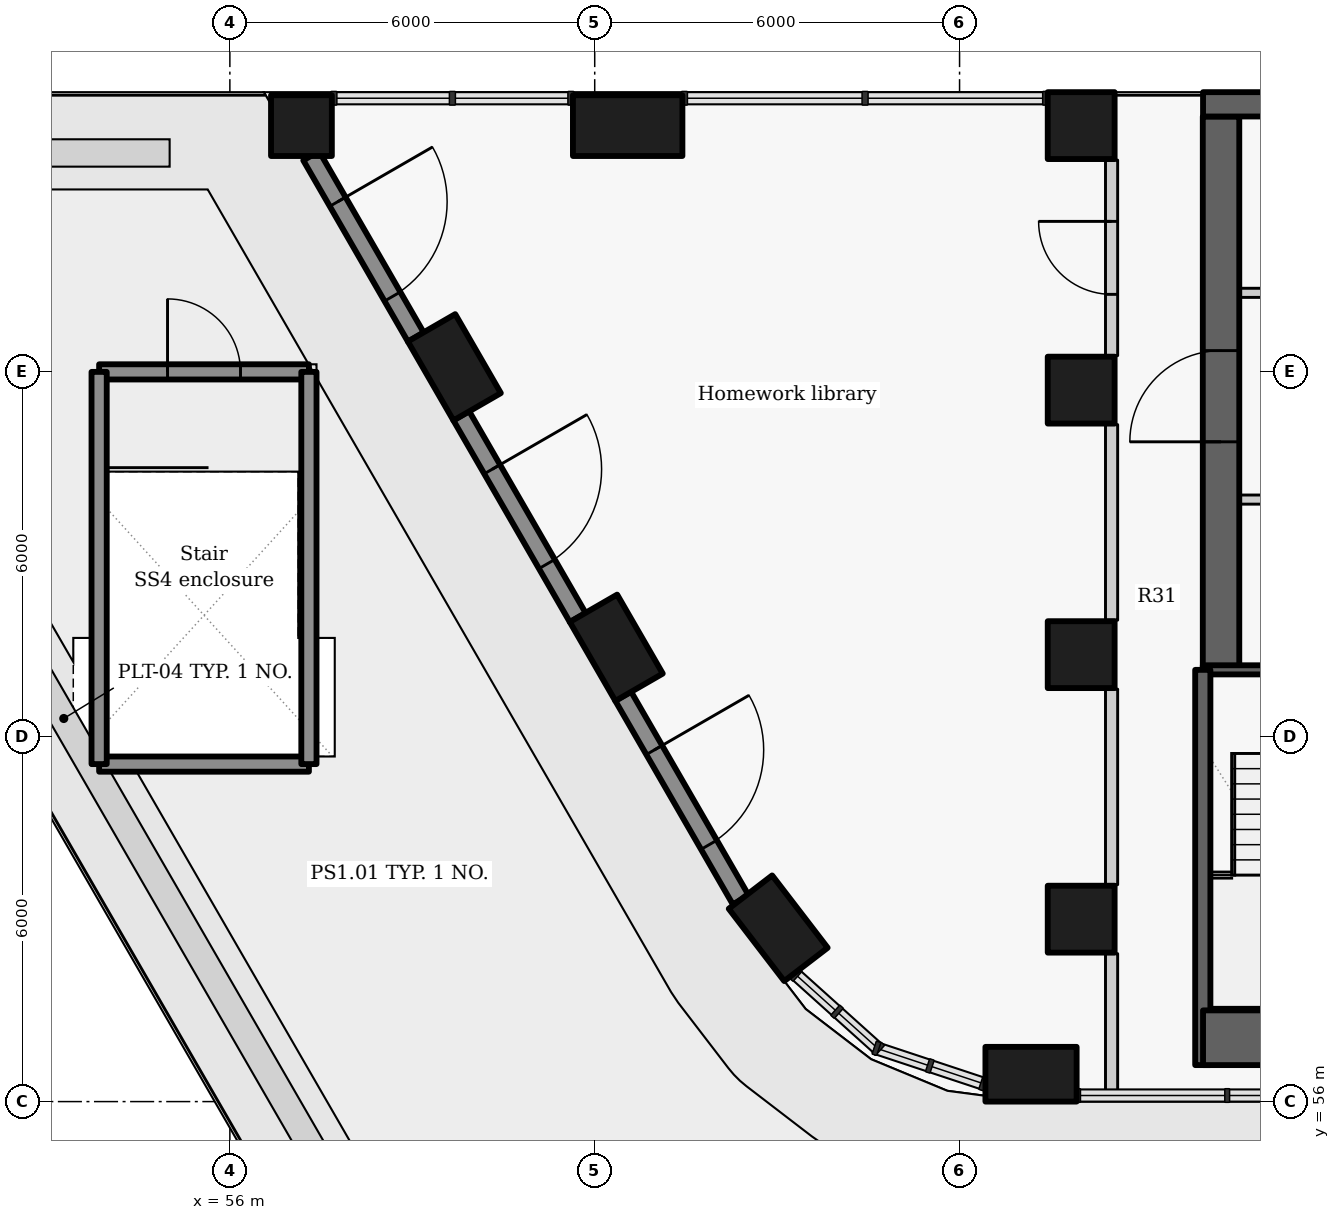
"""IFC4 building model, lengths in metres.
Left out: names, types, materials, properties, quantities, classifications, styles, units other than length and angle.
Written with IfcOpenShell. Run it as: python <this file> out.ifc"""

import sys

from ifc_helpers import new_model, si_unit, direction, frame, frame_2d, origin, origin_2d, place, context, subcontext, project, spatial, rectangle, extrude, element, fill, save


model = new_model("IFC4")
c1 = context("Model", 3, precision=1e-05, world=origin(), true_north=direction((0.0, 1.0)))
c2 = subcontext(c1, "Body", "Model", "MODEL_VIEW")
j1 = project(units=[si_unit("LENGTHUNIT", "METRE"), si_unit("PLANEANGLEUNIT", "RADIAN")], contexts=[c1])
p1 = place(None, origin())
s1 = spatial("IfcSite", under=j1, at=p1, CompositionType="ELEMENT")
p2 = place(p1, origin())
s2 = spatial("IfcBuilding", under=s1, at=p2, CompositionType="ELEMENT")
p3 = place(p2, frame((0.0, 0.0, 28.2)))
s3 = spatial("IfcBuildingStorey", under=s2, at=p3, CompositionType="ELEMENT", Elevation=28.2)
for number, where, z_axis, x_axis in (
    (1, (59.692, 68.075, 0.0), (0.0, 0.0, 1.0), (0.5, -0.866, 0.0)),
    (2, (62.354, 63.463, 0.0), (0.0, 0.0, 1.0), (0.5, -0.866, 0.0)),
    (3, (65.018, 58.851, 0.0), (0.0, 0.0, 1.0), (0.609, -0.793, 0.0)),
    (4, (69.175, 56.45, 0.0), (0.0, 0.0, 1.0), (1.0, 0.0, 0.0)),
):
    element("IfcColumn", number, at=place(p3, frame(where, z_axis=z_axis, x_axis=x_axis)), inside=s3, PredefinedType="COLUMN", context=c2, shape_type="SweptSolid", body=[
        extrude(rectangle(XDim=1.5, YDim=0.9, at=origin_2d()), origin(), (0.0, 0.0, 1.0), 3.3),
    ])
for number, where, z_axis, x_axis in (
    (5, (70.0, 72.05, 0.0), (0.0, 0.0, 1.0), (0.0, -1.0, 0.0)),
    (6, (70.0, 67.7, 0.0), (0.0, 0.0, 1.0), (0.0, -1.0, 0.0)),
    (7, (70.0, 63.35, 0.0), (0.0, 0.0, 1.0), (0.0, -1.0, 0.0)),
    (8, (70.0, 59.0, 0.0), (0.0, 0.0, 1.0), (0.0, -1.0, 0.0)),
):
    element("IfcColumn", number, at=place(p3, frame(where, z_axis=z_axis, x_axis=x_axis)), inside=s3, PredefinedType="COLUMN", context=c2, shape_type="SweptSolid", body=[
        extrude(rectangle(XDim=1.1, YDim=1.1, at=origin_2d()), origin(), (0.0, 0.0, 1.0), 3.3),
    ])
p4 = place(p3, frame((62.542, 72.05, 0.0), z_axis=(0.0, 0.0, 1.0), x_axis=(1.0, 0.0, 0.0)))
e9 = element("IfcColumn", 9, at=p4, inside=s3, PredefinedType="COLUMN", context=c2, shape_type="SweptSolid", body=[
    extrude(rectangle(XDim=1.8, YDim=1.0, at=origin_2d()), origin(), (0.0, 0.0, 1.0), 3.3),
])
p5 = place(p3, frame((57.177, 72.05, 0.0), z_axis=(0.0, 0.0, 1.0), x_axis=(1.0, 0.0, 0.0)))
e10 = element("IfcColumn", 10, at=p5, inside=s3, PredefinedType="COLUMN", context=c2, shape_type="SweptSolid", body=[
    extrude(rectangle(XDim=1.0, YDim=1.0, at=origin_2d()), origin(), (0.0, 0.0, 1.0), 3.3),
])
p6 = place(p3, frame((57.337, 71.553, 0.0), z_axis=(0.0, 0.0, 1.0), x_axis=(0.500035437112, -0.866004943191, 0.0)))
e11 = element("IfcWall", 11, at=p6, inside=s3, PredefinedType="SOLIDWALL", context=c2, shape_type="SweptSolid", body=[
    extrude(rectangle(XDim=3.444, YDim=0.3, at=frame_2d((1.722, 0.0))), origin(), (0.0, 0.0, 1.0), 2.425),
])
p7 = place(p6, frame((0.872, 0.0, 0.0)))
e12 = element("IfcOpeningElement", 12, at=p7, cuts=e11, PredefinedType="OPENING", context=c2, shape_type="SweptSolid", body=[
    extrude(rectangle(XDim=1.8, YDim=2.0, at=frame_2d((0.9, 1.0))), frame((0.0, 0.16, 0.0), z_axis=(0.0, -1.0, 0.0), x_axis=(1.0, 0.0, 0.0)), (0.0, 0.0, 1.0), 0.32),
])
p8 = place(p3, frame((59.805, 67.279, 0.0), z_axis=(0.0, 0.0, 1.0), x_axis=(0.500001735503, -0.866024401789, 0.0)))
e13 = element("IfcWall", 13, at=p8, inside=s3, PredefinedType="SOLIDWALL", context=c2, shape_type="SweptSolid", body=[
    extrude(rectangle(XDim=3.834, YDim=0.3, at=frame_2d((1.917, 0.0))), origin(), (0.0, 0.0, 1.0), 2.425),
])
p9 = place(p8, frame((1.017, 0.0, 0.0)))
e14 = element("IfcOpeningElement", 14, at=p9, cuts=e13, PredefinedType="OPENING", context=c2, shape_type="SweptSolid", body=[
    extrude(rectangle(XDim=1.8, YDim=2.0, at=frame_2d((0.9, 1.0))), frame((0.0, 0.16, 0.0), z_axis=(0.0, -1.0, 0.0), x_axis=(1.0, 0.0, 0.0)), (0.0, 0.0, 1.0), 0.32),
])
p10 = place(p3, frame((62.468, 62.667, 0.0), z_axis=(0.0, 0.0, 1.0), x_axis=(0.499948341072, -0.866055227026, 0.0)))
e15 = element("IfcWall", 15, at=p10, inside=s3, PredefinedType="SOLIDWALL", context=c2, shape_type="SweptSolid", body=[
    extrude(rectangle(XDim=3.867, YDim=0.3, at=frame_2d((1.934, 0.0))), origin(), (0.0, 0.0, 1.0), 2.425),
])
p11 = place(p10, frame((1.022, 0.0, 0.0)))
e16 = element("IfcOpeningElement", 16, at=p11, cuts=e15, PredefinedType="OPENING", context=c2, shape_type="SweptSolid", body=[
    extrude(rectangle(XDim=1.8, YDim=2.0, at=frame_2d((0.9, 1.0))), frame((0.0, 0.16, 0.0), z_axis=(0.0, -1.0, 0.0), x_axis=(1.0, 0.0, 0.0)), (0.0, 0.0, 1.0), 0.32),
])
p12 = place(p3, frame((72.0, 69.3, 0.0), z_axis=(0.0, 0.0, 1.0), x_axis=(1.0, 0.0, 0.0)))
e17 = element("IfcWall", 17, at=p12, inside=s3, PredefinedType="PARTITIONING", context=c2, shape_type="SweptSolid", body=[
    extrude(rectangle(XDim=2.6, YDim=0.15, at=frame_2d((1.3, 0.0))), origin(), (0.0, 0.0, 1.0), 3.025),
])
p13 = place(p12, frame((1.175, 0.0, 0.0)))
e18 = element("IfcOpeningElement", 18, at=p13, cuts=e17, PredefinedType="OPENING", context=c2, shape_type="SweptSolid", body=[
    extrude(rectangle(XDim=0.9, YDim=2.1, at=frame_2d((0.45, 1.05))), frame((0.0, 0.085, 0.0), z_axis=(0.0, -1.0, 0.0), x_axis=(1.0, 0.0, 0.0)), (0.0, 0.0, 1.0), 0.17),
])
p14 = place(p3, frame((72.3, 63.1, -0.275), z_axis=(0.0, 0.0, 1.0), x_axis=(0.0, 1.0, 0.0)))
e19 = element("IfcWall", 19, at=p14, inside=s3, PredefinedType="SHEAR", context=c2, shape_type="SweptSolid", body=[
    extrude(rectangle(XDim=9.1, YDim=0.6, at=frame_2d((4.55, 0.0))), origin(), (0.0, 0.0, 1.0), 3.3),
])
p15 = place(p14, frame((3.75, 0.0, 0.275)))
e20 = element("IfcOpeningElement", 20, at=p15, cuts=e19, PredefinedType="OPENING", context=c2, shape_type="SweptSolid", body=[
    extrude(rectangle(XDim=1.5, YDim=2.1, at=frame_2d((0.75, 1.05))), frame((0.0, 0.31, 0.0), z_axis=(0.0, -1.0, 0.0), x_axis=(1.0, 0.0, 0.0)), (0.0, 0.0, 1.0), 0.62),
])
p16 = place(p3, frame((74.603, 65.9, 0.0), z_axis=(0.0, 0.0, 1.0), x_axis=(-1.0, 0.0, 0.0)))
e21 = element("IfcWall", 21, at=p16, inside=s3, PredefinedType="PARTITIONING", context=c2, shape_type="SweptSolid", body=[
    extrude(rectangle(XDim=2.603, YDim=0.15, at=frame_2d((1.302, 0.0))), origin(), (0.0, 0.0, 1.0), 3.025),
])
p17 = place(p16, frame((0.428, 0.0, 0.0)))
e22 = element("IfcOpeningElement", 22, at=p17, cuts=e21, PredefinedType="OPENING", context=c2, shape_type="SweptSolid", body=[
    extrude(rectangle(XDim=1.1, YDim=2.1, at=frame_2d((0.55, 1.05))), frame((0.0, 0.085, 0.0), z_axis=(0.0, -1.0, 0.0), x_axis=(1.0, 0.0, 0.0)), (0.0, 0.0, 1.0), 0.17),
])
p18 = place(p3, frame((72.0, 63.1, -0.275), z_axis=(0.0, 0.0, 1.0), x_axis=(1.0, 0.0, 0.0)))
e23 = element("IfcWall", 23, at=p18, inside=s3, PredefinedType="SHEAR", context=c2, shape_type="SweptSolid", body=[
    extrude(rectangle(XDim=2.6, YDim=0.15, at=frame_2d((1.3, 0.0))), origin(), (0.0, 0.0, 1.0), 3.3),
])
p19 = place(p18, frame((1.02, 0.0, 0.275)))
e24 = element("IfcOpeningElement", 24, at=p19, cuts=e23, PredefinedType="OPENING", context=c2, shape_type="SweptSolid", body=[
    extrude(rectangle(XDim=1.1, YDim=2.1, at=frame_2d((0.55, 1.05))), frame((0.0, 0.085, 0.0), z_axis=(0.0, -1.0, 0.0), x_axis=(1.0, 0.0, 0.0)), (0.0, 0.0, 1.0), 0.17),
])
p20 = place(p3, frame((72.0, 56.6, -0.275), z_axis=(0.0, 0.0, 1.0), x_axis=(0.0, 1.0, 0.0)))
e25 = element("IfcWall", 25, at=p20, inside=s3, PredefinedType="SHEAR", context=c2, shape_type="SweptSolid", body=[
    extrude(rectangle(XDim=6.5, YDim=0.25, at=frame_2d((3.25, 0.0))), origin(), (0.0, 0.0, 1.0), 3.3),
])
p21 = place(p3, frame((70.5, 56.18, 0.0), z_axis=(0.0, 0.0, 1.0), x_axis=(0.0, 1.0, 0.0)))
e26 = element("IfcWall", 26, at=p21, inside=s3, PredefinedType="PARTITIONING", context=c2, shape_type="SweptSolid", body=[
    extrude(rectangle(XDim=2.253, YDim=0.2, at=frame_2d((1.126, 0.0))), origin(), (0.0, 0.0, 1.0), 3.025),
])
for number, where, z_axis, x_axis in (
    (27, (70.5, 59.567, 0.0), (0.0, 0.0, 1.0), (0.0, 1.0, 0.0)),
    (28, (70.5, 63.917, 0.0), (0.0, 0.0, 1.0), (0.0, 1.0, 0.0)),
):
    element("IfcWall", number, at=place(p3, frame(where, z_axis=z_axis, x_axis=x_axis)), inside=s3, PredefinedType="PARTITIONING", context=c2, shape_type="SweptSolid", body=[
        extrude(rectangle(XDim=3.216, YDim=0.2, at=frame_2d((1.608, 0.0))), origin(), (0.0, 0.0, 1.0), 3.025),
    ])
p22 = place(p3, frame((70.5, 68.267, 0.0), z_axis=(0.0, 0.0, 1.0), x_axis=(0.0, 1.0, 0.0)))
e29 = element("IfcWall", 29, at=p22, inside=s3, PredefinedType="PARTITIONING", context=c2, shape_type="SweptSolid", body=[
    extrude(rectangle(XDim=3.216, YDim=0.2, at=frame_2d((1.608, 0.0))), origin(), (0.0, 0.0, 1.0), 3.025),
])
p23 = place(p22, frame((1.008, 0.0, 0.0)))
e30 = element("IfcOpeningElement", 30, at=p23, cuts=e29, PredefinedType="OPENING", context=c2, shape_type="SweptSolid", body=[
    extrude(rectangle(XDim=1.2, YDim=2.1, at=frame_2d((0.6, 1.05))), frame((0.0, 0.11, 0.0), z_axis=(0.0, -1.0, 0.0), x_axis=(1.0, 0.0, 0.0)), (0.0, 0.0, 1.0), 0.22),
])
p24 = place(p3, frame((72.004, 72.4, -0.275), z_axis=(0.0, 0.0, 1.0), x_axis=(1.0, 0.0, 0.0)))
e31 = element("IfcWall", 31, at=p24, inside=s3, PredefinedType="SHEAR", context=c2, shape_type="SweptSolid", body=[
    extrude(rectangle(XDim=15.992, YDim=0.4, at=frame_2d((7.996, 0.0))), origin(), (0.0, 0.0, 1.0), 3.3),
])
p25 = place(p3, frame((72.004, 57.05, -0.275), z_axis=(0.0, 0.0, 1.0), x_axis=(1.0, 0.0, 0.0)))
e32 = element("IfcWall", 32, at=p25, inside=s3, PredefinedType="SHEAR", context=c2, shape_type="SweptSolid", body=[
    extrude(rectangle(XDim=15.992, YDim=0.9, at=frame_2d((7.996, 0.0))), origin(), (0.0, 0.0, 1.0), 3.3),
])
p26 = place(p3, frame((53.85, 68.0, 0.0), z_axis=(0.0, 0.0, 1.0), x_axis=(1.0, 0.0, 0.0)))
e33 = element("IfcWall", 33, at=p26, inside=s3, PredefinedType="SHEAR", context=c2, shape_type="SweptSolid", body=[
    extrude(rectangle(XDim=3.45, YDim=0.25, at=frame_2d((1.725, 0.0))), origin(), (0.0, 0.0, 1.0), 2.5),
])
p27 = place(p26, frame((1.125, 0.0, 0.0)))
e34 = element("IfcOpeningElement", 34, at=p27, cuts=e33, PredefinedType="OPENING", context=c2, shape_type="SweptSolid", body=[
    extrude(rectangle(XDim=1.2, YDim=2.1, at=frame_2d((0.6, 1.05))), frame((0.0, 0.135, 0.0), z_axis=(0.0, -1.0, 0.0), x_axis=(1.0, 0.0, 0.0)), (0.0, 0.0, 1.0), 0.27),
])
p28 = place(p3, frame((57.3, 61.55, 0.0), z_axis=(0.0, 0.0, 1.0), x_axis=(-1.0, 0.0, 0.0)))
e35 = element("IfcWall", 35, at=p28, inside=s3, PredefinedType="SHEAR", context=c2, shape_type="SweptSolid", body=[
    extrude(rectangle(XDim=3.45, YDim=0.25, at=frame_2d((1.725, 0.0))), origin(), (0.0, 0.0, 1.0), 2.5),
])
for number, where, z_axis, x_axis in (
    (36, (57.3, 61.55, 0.0), (0.0, 0.0, 1.0), (0.0, 1.0, 0.0)),
    (37, (53.85, 68.0, 0.0), (0.0, 0.0, 1.0), (0.0, -1.0, 0.0)),
):
    element("IfcWall", number, at=place(p3, frame(where, z_axis=z_axis, x_axis=x_axis)), inside=s3, PredefinedType="SHEAR", context=c2, shape_type="SweptSolid", body=[
        extrude(rectangle(XDim=6.45, YDim=0.25, at=frame_2d((3.225, 0.0))), origin(), (0.0, 0.0, 1.0), 2.5),
    ])
p29 = place(p7, frame((1.8, 0.0, 0.0), z_axis=(0.0, 0.0, 1.0), x_axis=(-1.0, 0.0, 0.0)))
e38 = element("IfcDoor", 38, at=p29, inside=s3, OperationType="DOUBLE_DOOR_SINGLE_SWING", PredefinedType="DOOR", context=c2, shape_type="SweptSolid", body=[
    extrude(rectangle(XDim=1.8, YDim=2.0, at=frame_2d((0.9, 1.0))), frame((0.0, 0.025, 0.0), z_axis=(0.0, -1.0, 0.0), x_axis=(1.0, 0.0, 0.0)), (0.0, 0.0, 1.0), 0.05),
])
fill(e12, e38)
p30 = place(p9, frame((1.8, 0.0, 0.0), z_axis=(0.0, 0.0, 1.0), x_axis=(-1.0, 0.0, 0.0)))
e39 = element("IfcDoor", 39, at=p30, inside=s3, OperationType="DOUBLE_DOOR_SINGLE_SWING", PredefinedType="DOOR", context=c2, shape_type="SweptSolid", body=[
    extrude(rectangle(XDim=1.8, YDim=2.0, at=frame_2d((0.9, 1.0))), frame((0.0, 0.025, 0.0), z_axis=(0.0, -1.0, 0.0), x_axis=(1.0, 0.0, 0.0)), (0.0, 0.0, 1.0), 0.05),
])
fill(e14, e39)
p31 = place(p11, frame((1.8, 0.0, 0.0), z_axis=(0.0, 0.0, 1.0), x_axis=(-1.0, 0.0, 0.0)))
e40 = element("IfcDoor", 40, at=p31, inside=s3, OperationType="DOUBLE_DOOR_SINGLE_SWING", PredefinedType="DOOR", context=c2, shape_type="SweptSolid", body=[
    extrude(rectangle(XDim=1.8, YDim=2.0, at=frame_2d((0.9, 1.0))), frame((0.0, 0.025, 0.0), z_axis=(0.0, -1.0, 0.0), x_axis=(1.0, 0.0, 0.0)), (0.0, 0.0, 1.0), 0.05),
])
fill(e16, e40)
p32 = place(p23, origin())
e41 = element("IfcDoor", 41, at=p32, inside=s3, OperationType="SINGLE_SWING_RIGHT", PredefinedType="DOOR", context=c2, shape_type="SweptSolid", body=[
    extrude(rectangle(XDim=1.2, YDim=2.1, at=frame_2d((0.6, 1.05))), frame((0.0, 0.025, 0.0), z_axis=(0.0, -1.0, 0.0), x_axis=(1.0, 0.0, 0.0)), (0.0, 0.0, 1.0), 0.05),
])
fill(e30, e41)
p33 = place(p15, origin())
e42 = element("IfcDoor", 42, at=p33, inside=s3, OperationType="DOUBLE_DOOR_SINGLE_SWING", PredefinedType="DOOR", context=c2, shape_type="SweptSolid", body=[
    extrude(rectangle(XDim=1.5, YDim=2.1, at=frame_2d((0.75, 1.05))), frame((0.0, 0.025, 0.0), z_axis=(0.0, -1.0, 0.0), x_axis=(1.0, 0.0, 0.0)), (0.0, 0.0, 1.0), 0.05),
])
fill(e20, e42)
p34 = place(p27, frame((1.2, 0.0, 0.0), z_axis=(0.0, 0.0, 1.0), x_axis=(-1.0, 0.0, 0.0)))
e43 = element("IfcDoor", 43, at=p34, inside=s3, OperationType="DOUBLE_DOOR_SINGLE_SWING", PredefinedType="DOOR", context=c2, shape_type="SweptSolid", body=[
    extrude(rectangle(XDim=1.2, YDim=2.1, at=frame_2d((0.6, 1.05))), frame((0.0, 0.025, 0.0), z_axis=(0.0, -1.0, 0.0), x_axis=(1.0, 0.0, 0.0)), (0.0, 0.0, 1.0), 0.05),
])
fill(e34, e43)
save(model, sys.argv[1])
